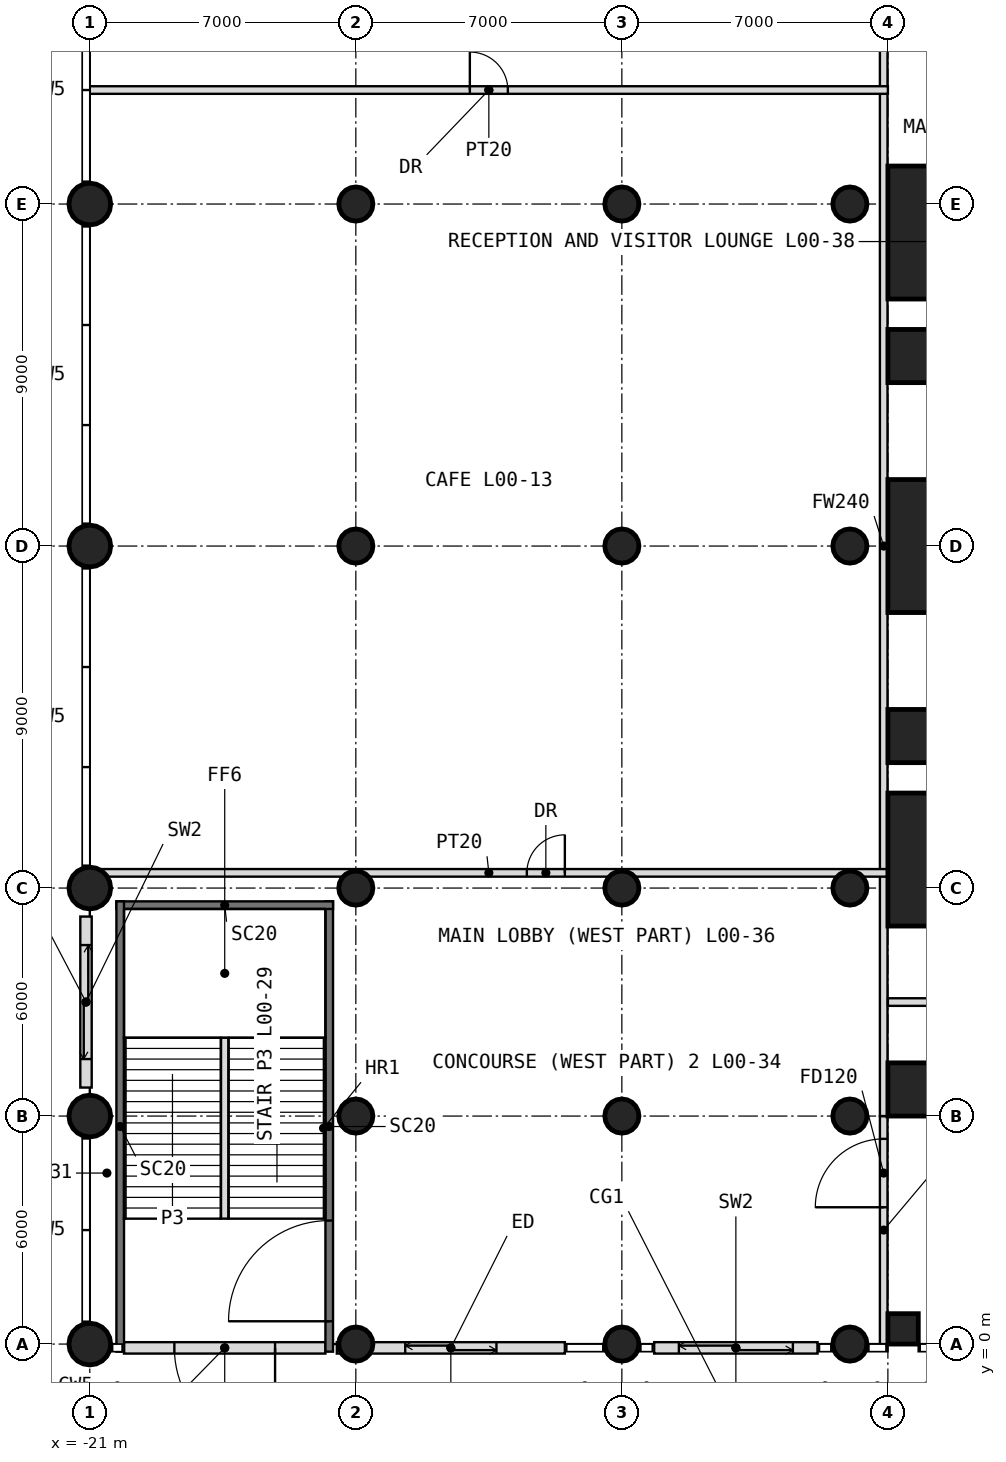
"""IFC4 building model, lengths in metres.
Left out: names, types, materials, properties, quantities, classifications, styles, units other than length and angle.
Written with IfcOpenShell. Run it as: python <this file> out.ifc"""

import sys

from ifc_helpers import new_model, si_unit, direction, frame, frame_2d, origin, origin_2d, place, context, subcontext, project, spatial, rectangle, circle, extrude, element, fill, save


model = new_model("IFC4")
c1 = context("Model", 3, precision=1e-05, world=origin(), true_north=direction((0.0, 1.0)))
c2 = subcontext(c1, "Body", "Model", "MODEL_VIEW")
j1 = project(units=[si_unit("LENGTHUNIT", "METRE"), si_unit("PLANEANGLEUNIT", "RADIAN")], contexts=[c1])
p1 = place(None, origin())
s1 = spatial("IfcSite", under=j1, at=p1, CompositionType="ELEMENT")
p2 = place(p1, origin())
s2 = spatial("IfcBuilding", under=s1, at=p2, CompositionType="ELEMENT")
p3 = place(p2, origin())
s3 = spatial("IfcBuildingStorey", under=s2, at=p3, CompositionType="ELEMENT", Elevation=0.0)
p4 = place(p3, frame((-21.0, 0.0, -0.4), z_axis=(0.0, 0.0, 1.0), x_axis=(1.0, 0.0, 0.0)))
e1 = element("IfcColumn", 1, at=p4, inside=s3, PredefinedType="COLUMN", context=c2, shape_type="SweptSolid", body=[
    extrude(circle(Radius=0.55, at=origin_2d()), origin(), (0.0, 0.0, 1.0), 6.4),
])
for number, where, z_axis, x_axis in (
    (2, (-14.0, 0.0, -0.4), (0.0, 0.0, 1.0), (1.0, 0.0, 0.0)),
    (3, (-7.0, 0.0, -0.4), (0.0, 0.0, 1.0), (1.0, 0.0, 0.0)),
    (4, (-1.0, 0.0, -0.4), (0.0, 0.0, 1.0), (1.0, 0.0, 0.0)),
):
    element("IfcColumn", number, at=place(p3, frame(where, z_axis=z_axis, x_axis=x_axis)), inside=s3, PredefinedType="COLUMN", context=c2, shape_type="SweptSolid", body=[
        extrude(circle(Radius=0.45, at=origin_2d()), origin(), (0.0, 0.0, 1.0), 6.4),
    ])
p5 = place(p3, frame((0.4, 0.4, -0.4), z_axis=(0.0, 0.0, 1.0), x_axis=(1.0, 0.0, 0.0)))
e5 = element("IfcColumn", 5, at=p5, inside=s3, PredefinedType="COLUMN", context=c2, shape_type="SweptSolid", body=[
    extrude(rectangle(XDim=0.8, YDim=0.8, at=origin_2d()), origin(), (0.0, 0.0, 1.0), 6.4),
])
p6 = place(p3, frame((-21.0, 6.0, -0.4), z_axis=(0.0, 0.0, 1.0), x_axis=(1.0, 0.0, 0.0)))
e6 = element("IfcColumn", 6, at=p6, inside=s3, PredefinedType="COLUMN", context=c2, shape_type="SweptSolid", body=[
    extrude(circle(Radius=0.55, at=origin_2d()), origin(), (0.0, 0.0, 1.0), 6.4),
])
for number, where, z_axis, x_axis in (
    (7, (-14.0, 6.0, -0.4), (0.0, 0.0, 1.0), (1.0, 0.0, 0.0)),
    (8, (-7.0, 6.0, -0.4), (0.0, 0.0, 1.0), (1.0, 0.0, 0.0)),
    (9, (-1.0, 6.0, -0.4), (0.0, 0.0, 1.0), (1.0, 0.0, 0.0)),
):
    element("IfcColumn", number, at=place(p3, frame(where, z_axis=z_axis, x_axis=x_axis)), inside=s3, PredefinedType="COLUMN", context=c2, shape_type="SweptSolid", body=[
        extrude(circle(Radius=0.45, at=origin_2d()), origin(), (0.0, 0.0, 1.0), 6.4),
    ])
p7 = place(p3, frame((0.7, 6.7, -0.4), z_axis=(0.0, 0.0, 1.0), x_axis=(1.0, 0.0, 0.0)))
e10 = element("IfcColumn", 10, at=p7, inside=s3, PredefinedType="COLUMN", context=c2, shape_type="SweptSolid", body=[
    extrude(rectangle(XDim=1.4, YDim=1.4, at=origin_2d()), origin(), (0.0, 0.0, 1.0), 6.4),
])
p8 = place(p3, frame((1.75, 12.75, -0.4), z_axis=(0.0, 0.0, 1.0), x_axis=(1.0, 0.0, 0.0)))
e11 = element("IfcColumn", 11, at=p8, inside=s3, PredefinedType="COLUMN", context=c2, shape_type="SweptSolid", body=[
    extrude(rectangle(XDim=3.5, YDim=3.5, at=origin_2d()), origin(), (0.0, 0.0, 1.0), 6.4),
])
p9 = place(p3, frame((-21.0, 12.0, -0.4), z_axis=(0.0, 0.0, 1.0), x_axis=(1.0, 0.0, 0.0)))
e12 = element("IfcColumn", 12, at=p9, inside=s3, PredefinedType="COLUMN", context=c2, shape_type="SweptSolid", body=[
    extrude(circle(Radius=0.55, at=origin_2d()), origin(), (0.0, 0.0, 1.0), 6.4),
])
for number, where, z_axis, x_axis in (
    (13, (-14.0, 12.0, -0.4), (0.0, 0.0, 1.0), (1.0, 0.0, 0.0)),
    (14, (-7.0, 12.0, -0.4), (0.0, 0.0, 1.0), (1.0, 0.0, 0.0)),
    (15, (-1.0, 12.0, -0.4), (0.0, 0.0, 1.0), (1.0, 0.0, 0.0)),
):
    element("IfcColumn", number, at=place(p3, frame(where, z_axis=z_axis, x_axis=x_axis)), inside=s3, PredefinedType="COLUMN", context=c2, shape_type="SweptSolid", body=[
        extrude(circle(Radius=0.45, at=origin_2d()), origin(), (0.0, 0.0, 1.0), 6.4),
    ])
p10 = place(p3, frame((0.7, 16.0, -0.4), z_axis=(0.0, 0.0, 1.0), x_axis=(1.0, 0.0, 0.0)))
e16 = element("IfcColumn", 16, at=p10, inside=s3, PredefinedType="COLUMN", context=c2, shape_type="SweptSolid", body=[
    extrude(rectangle(XDim=1.4, YDim=1.4, at=origin_2d()), origin(), (0.0, 0.0, 1.0), 6.4),
])
p11 = place(p3, frame((-21.0, 21.0, -0.4), z_axis=(0.0, 0.0, 1.0), x_axis=(1.0, 0.0, 0.0)))
e17 = element("IfcColumn", 17, at=p11, inside=s3, PredefinedType="COLUMN", context=c2, shape_type="SweptSolid", body=[
    extrude(circle(Radius=0.55, at=origin_2d()), origin(), (0.0, 0.0, 1.0), 6.4),
])
for number, where, z_axis, x_axis in (
    (18, (-14.0, 21.0, -0.4), (0.0, 0.0, 1.0), (1.0, 0.0, 0.0)),
    (19, (-7.0, 21.0, -0.4), (0.0, 0.0, 1.0), (1.0, 0.0, 0.0)),
    (20, (-1.0, 21.0, -0.4), (0.0, 0.0, 1.0), (1.0, 0.0, 0.0)),
):
    element("IfcColumn", number, at=place(p3, frame(where, z_axis=z_axis, x_axis=x_axis)), inside=s3, PredefinedType="COLUMN", context=c2, shape_type="SweptSolid", body=[
        extrude(circle(Radius=0.45, at=origin_2d()), origin(), (0.0, 0.0, 1.0), 6.4),
    ])
p12 = place(p3, frame((1.75, 21.0, -0.4), z_axis=(0.0, 0.0, 1.0), x_axis=(1.0, 0.0, 0.0)))
e21 = element("IfcColumn", 21, at=p12, inside=s3, PredefinedType="COLUMN", context=c2, shape_type="SweptSolid", body=[
    extrude(rectangle(XDim=3.5, YDim=3.5, at=origin_2d()), origin(), (0.0, 0.0, 1.0), 6.4),
])
p13 = place(p3, frame((0.7, 26.0, -0.4), z_axis=(0.0, 0.0, 1.0), x_axis=(1.0, 0.0, 0.0)))
e22 = element("IfcColumn", 22, at=p13, inside=s3, PredefinedType="COLUMN", context=c2, shape_type="SweptSolid", body=[
    extrude(rectangle(XDim=1.4, YDim=1.4, at=origin_2d()), origin(), (0.0, 0.0, 1.0), 6.4),
])
p14 = place(p3, frame((-21.0, 30.0, -0.4), z_axis=(0.0, 0.0, 1.0), x_axis=(1.0, 0.0, 0.0)))
e23 = element("IfcColumn", 23, at=p14, inside=s3, PredefinedType="COLUMN", context=c2, shape_type="SweptSolid", body=[
    extrude(circle(Radius=0.55, at=origin_2d()), origin(), (0.0, 0.0, 1.0), 6.4),
])
for number, where, z_axis, x_axis in (
    (24, (-14.0, 30.0, -0.4), (0.0, 0.0, 1.0), (1.0, 0.0, 0.0)),
    (25, (-7.0, 30.0, -0.4), (0.0, 0.0, 1.0), (1.0, 0.0, 0.0)),
    (26, (-1.0, 30.0, -0.4), (0.0, 0.0, 1.0), (1.0, 0.0, 0.0)),
):
    element("IfcColumn", number, at=place(p3, frame(where, z_axis=z_axis, x_axis=x_axis)), inside=s3, PredefinedType="COLUMN", context=c2, shape_type="SweptSolid", body=[
        extrude(circle(Radius=0.45, at=origin_2d()), origin(), (0.0, 0.0, 1.0), 6.4),
    ])
p15 = place(p3, frame((1.75, 29.25, -0.4), z_axis=(0.0, 0.0, 1.0), x_axis=(1.0, 0.0, 0.0)))
e27 = element("IfcColumn", 27, at=p15, inside=s3, PredefinedType="COLUMN", context=c2, shape_type="SweptSolid", body=[
    extrude(rectangle(XDim=3.5, YDim=3.5, at=origin_2d()), origin(), (0.0, 0.0, 1.0), 6.4),
])
p16 = place(p3, frame((-14.8, -0.1, 0.0), z_axis=(0.0, 0.0, 1.0), x_axis=(-1.0, 0.0, 0.0)))
e28 = element("IfcWall", 28, at=p16, inside=s3, PredefinedType="USERDEFINED", context=c2, shape_type="SweptSolid", body=[
    extrude(rectangle(XDim=5.3, YDim=0.3, at=frame_2d((2.65, 0.0))), origin(), (0.0, 0.0, 1.0), 4.6),
])
p17 = place(p16, frame((1.325, 0.0, 0.0)))
e29 = element("IfcOpeningElement", 29, at=p17, cuts=e28, PredefinedType="OPENING", context=c2, shape_type="SweptSolid", body=[
    extrude(rectangle(XDim=2.65, YDim=2.4, at=frame_2d((1.325, 1.2))), frame((0.0, 0.16, 0.0), z_axis=(0.0, -1.0, 0.0), x_axis=(1.0, 0.0, 0.0)), (0.0, 0.0, 1.0), 0.32),
])
p18 = place(p3, frame((-14.5, -0.1, 0.0), z_axis=(0.0, 0.0, 1.0), x_axis=(1.0, 0.0, 0.0)))
e30 = element("IfcWall", 30, at=p18, inside=s3, PredefinedType="USERDEFINED", context=c2, shape_type="SweptSolid", body=[
    extrude(rectangle(XDim=6.0, YDim=0.3, at=frame_2d((3.0, 0.0))), origin(), (0.0, 0.0, 1.0), 4.6),
])
p19 = place(p18, frame((1.8, 0.0, 0.0)))
e31 = element("IfcOpeningElement", 31, at=p19, cuts=e30, PredefinedType="OPENING", context=c2, shape_type="SweptSolid", body=[
    extrude(rectangle(XDim=2.4, YDim=3.0, at=frame_2d((1.2, 1.5))), frame((0.0, 0.16, 0.0), z_axis=(0.0, -1.0, 0.0), x_axis=(1.0, 0.0, 0.0)), (0.0, 0.0, 1.0), 0.32),
])
p20 = place(p3, frame((-6.15, -0.1, 0.0), z_axis=(0.0, 0.0, 1.0), x_axis=(1.0, 0.0, 0.0)))
e32 = element("IfcWall", 32, at=p20, inside=s3, PredefinedType="USERDEFINED", context=c2, shape_type="SweptSolid", body=[
    extrude(rectangle(XDim=4.3, YDim=0.3, at=frame_2d((2.15, 0.0))), origin(), (0.0, 0.0, 1.0), 4.6),
])
p21 = place(p20, frame((0.65, 0.0, 0.0)))
e33 = element("IfcOpeningElement", 33, at=p21, cuts=e32, PredefinedType="OPENING", context=c2, shape_type="SweptSolid", body=[
    extrude(rectangle(XDim=3.0, YDim=3.0, at=frame_2d((1.5, 1.5))), frame((0.0, 0.16, 0.0), z_axis=(0.0, -1.0, 0.0), x_axis=(1.0, 0.0, 0.0)), (0.0, 0.0, 1.0), 0.32),
])
p22 = place(p3, frame((-21.1, 11.25, 0.0), z_axis=(0.0, 0.0, 1.0), x_axis=(0.0, -1.0, 0.0)))
e34 = element("IfcWall", 34, at=p22, inside=s3, PredefinedType="USERDEFINED", context=c2, shape_type="SweptSolid", body=[
    extrude(rectangle(XDim=4.5, YDim=0.3, at=frame_2d((2.25, 0.0))), origin(), (0.0, 0.0, 1.0), 4.6),
])
p23 = place(p22, frame((0.75, 0.0, 0.0)))
e35 = element("IfcOpeningElement", 35, at=p23, cuts=e34, PredefinedType="OPENING", context=c2, shape_type="SweptSolid", body=[
    extrude(rectangle(XDim=3.0, YDim=3.0, at=frame_2d((1.5, 1.5))), frame((0.0, 0.16, 0.0), z_axis=(0.0, -1.0, 0.0), x_axis=(1.0, 0.0, 0.0)), (0.0, 0.0, 1.0), 0.32),
])
p24 = place(p3, frame((-14.7, -0.2, 0.0), z_axis=(0.0, 0.0, 1.0), x_axis=(0.0, 1.0, 0.0)))
e36 = element("IfcWall", 36, at=p24, inside=s3, PredefinedType="SOLIDWALL", context=c2, shape_type="SweptSolid", body=[
    extrude(rectangle(XDim=11.85, YDim=0.2, at=frame_2d((5.925, 0.0))), origin(), (0.0, 0.0, 1.0), 5.8),
])
p25 = place(p24, frame((0.8, 0.0, 0.0)))
e37 = element("IfcOpeningElement", 37, at=p25, cuts=e36, PredefinedType="OPENING", context=c2, shape_type="SweptSolid", body=[
    extrude(rectangle(XDim=2.65, YDim=2.4, at=frame_2d((1.325, 1.2))), frame((0.0, 0.11, 0.0), z_axis=(0.0, -1.0, 0.0), x_axis=(1.0, 0.0, 0.0)), (0.0, 0.0, 1.0), 0.22),
])
p26 = place(p3, frame((-14.6, 11.55, 0.0), z_axis=(0.0, 0.0, 1.0), x_axis=(-1.0, 0.0, 0.0)))
e38 = element("IfcWall", 38, at=p26, inside=s3, PredefinedType="SOLIDWALL", context=c2, shape_type="SweptSolid", body=[
    extrude(rectangle(XDim=5.7, YDim=0.2, at=frame_2d((2.85, 0.0))), origin(), (0.0, 0.0, 1.0), 5.8),
])
p27 = place(p3, frame((-20.2, 11.65, 0.0), z_axis=(0.0, 0.0, 1.0), x_axis=(0.0, -1.0, 0.0)))
e39 = element("IfcWall", 39, at=p27, inside=s3, PredefinedType="SOLIDWALL", context=c2, shape_type="SweptSolid", body=[
    extrude(rectangle(XDim=11.85, YDim=0.2, at=frame_2d((5.925, 0.0))), origin(), (0.0, 0.0, 1.0), 5.8),
])
p28 = place(p3, frame((-0.11, 0.0, 0.0), z_axis=(0.0, 0.0, 1.0), x_axis=(0.0, 1.0, 0.0)))
e40 = element("IfcWall", 40, at=p28, inside=s3, PredefinedType="PARTITIONING", context=c2, shape_type="SweptSolid", body=[
    extrude(rectangle(XDim=6.0, YDim=0.2, at=frame_2d((3.0, 0.0))), origin(), (0.0, 0.0, 1.0), 4.98),
])
p29 = place(p28, frame((3.6, 0.0, 0.0)))
e41 = element("IfcOpeningElement", 41, at=p29, cuts=e40, PredefinedType="OPENING", context=c2, shape_type="SweptSolid", body=[
    extrude(rectangle(XDim=1.8, YDim=2.4, at=frame_2d((0.9, 1.2))), frame((0.0, 0.11, 0.0), z_axis=(0.0, -1.0, 0.0), x_axis=(1.0, 0.0, 0.0)), (0.0, 0.0, 1.0), 0.22),
])
p30 = place(p3, frame((-0.11, 6.0, 0.0), z_axis=(0.0, 0.0, 1.0), x_axis=(0.0, 1.0, 0.0)))
e42 = element("IfcWall", 42, at=p30, inside=s3, PredefinedType="PARTITIONING", context=c2, shape_type="SweptSolid", body=[
    extrude(rectangle(XDim=30.0, YDim=0.2, at=frame_2d((15.0, 0.0))), origin(), (0.0, 0.0, 1.0), 5.6),
])
p31 = place(p3, frame((-21.0, 12.4, 0.0), z_axis=(0.0, 0.0, 1.0), x_axis=(1.0, 0.0, 0.0)))
e43 = element("IfcWall", 43, at=p31, inside=s3, PredefinedType="PARTITIONING", context=c2, shape_type="SweptSolid", body=[
    extrude(rectangle(XDim=21.0, YDim=0.2, at=frame_2d((10.5, 0.0))), origin(), (0.0, 0.0, 1.0), 5.6),
])
p32 = place(p31, frame((11.5, 0.0, 0.0)))
e44 = element("IfcOpeningElement", 44, at=p32, cuts=e43, PredefinedType="OPENING", context=c2, shape_type="SweptSolid", body=[
    extrude(rectangle(XDim=1.0, YDim=2.2, at=frame_2d((0.5, 1.1))), frame((0.0, 0.11, 0.0), z_axis=(0.0, -1.0, 0.0), x_axis=(1.0, 0.0, 0.0)), (0.0, 0.0, 1.0), 0.22),
])
p33 = place(p3, frame((-21.0, 33.0, 0.0), z_axis=(0.0, 0.0, 1.0), x_axis=(1.0, 0.0, 0.0)))
e45 = element("IfcWall", 45, at=p33, inside=s3, PredefinedType="PARTITIONING", context=c2, shape_type="SweptSolid", body=[
    extrude(rectangle(XDim=21.0, YDim=0.2, at=frame_2d((10.5, 0.0))), origin(), (0.0, 0.0, 1.0), 5.6),
])
p34 = place(p33, frame((10.0, 0.0, 0.0)))
e46 = element("IfcOpeningElement", 46, at=p34, cuts=e45, PredefinedType="OPENING", context=c2, shape_type="SweptSolid", body=[
    extrude(rectangle(XDim=1.0, YDim=2.2, at=frame_2d((0.5, 1.1))), frame((0.0, 0.11, 0.0), z_axis=(0.0, -1.0, 0.0), x_axis=(1.0, 0.0, 0.0)), (0.0, 0.0, 1.0), 0.22),
])
p35 = place(p3, frame((0.0, 9.0, 0.0), z_axis=(0.0, 0.0, 1.0), x_axis=(1.0, 0.0, 0.0)))
e47 = element("IfcWall", 47, at=p35, inside=s3, PredefinedType="PARTITIONING", context=c2, shape_type="SweptSolid", body=[
    extrude(rectangle(XDim=42.0, YDim=0.2, at=frame_2d((21.0, 0.0))), origin(), (0.0, 0.0, 1.0), 5.6),
])
p36 = place(p35, frame((11.0, 0.0, 0.0)))
e48 = element("IfcOpeningElement", 48, at=p36, cuts=e47, PredefinedType="OPENING", context=c2, shape_type="SweptSolid", body=[
    extrude(rectangle(XDim=2.0, YDim=2.2, at=frame_2d((1.0, 1.1))), frame((0.0, 0.11, 0.0), z_axis=(0.0, -1.0, 0.0), x_axis=(1.0, 0.0, 0.0)), (0.0, 0.0, 1.0), 0.22),
])
p37 = place(p35, frame((32.0, 0.0, 0.0)))
e49 = element("IfcOpeningElement", 49, at=p37, cuts=e47, PredefinedType="OPENING", context=c2, shape_type="SweptSolid", body=[
    extrude(rectangle(XDim=2.0, YDim=2.2, at=frame_2d((1.0, 1.1))), frame((0.0, 0.11, 0.0), z_axis=(0.0, -1.0, 0.0), x_axis=(1.0, 0.0, 0.0)), (0.0, 0.0, 1.0), 0.22),
])
p38 = place(p3, frame((-17.45, 3.3, 0.0), z_axis=(0.0, 0.0, 1.0), x_axis=(0.0, 1.0, 0.0)))
e50 = element("IfcWall", 50, at=p38, inside=s3, PredefinedType="PARTITIONING", context=c2, shape_type="SweptSolid", body=[
    extrude(rectangle(XDim=4.76, YDim=0.2, at=frame_2d((2.38, 0.0))), origin(), (0.0, 0.0, 1.0), 6.0),
])
p39 = place(p17, origin())
e51 = element("IfcDoor", 51, at=p39, inside=s3, OperationType="DOUBLE_DOOR_SINGLE_SWING", PredefinedType="DOOR", context=c2, shape_type="SweptSolid", body=[
    extrude(rectangle(XDim=2.65, YDim=2.4, at=frame_2d((1.325, 1.2))), frame((0.0, 0.025, 0.0), z_axis=(0.0, -1.0, 0.0), x_axis=(1.0, 0.0, 0.0)), (0.0, 0.0, 1.0), 0.05),
])
fill(e29, e51)
p40 = place(p19, origin())
e52 = element("IfcDoor", 52, at=p40, inside=s3, OperationType="DOUBLE_DOOR_SLIDING", PredefinedType="DOOR", context=c2, shape_type="SweptSolid", body=[
    extrude(rectangle(XDim=2.4, YDim=3.0, at=frame_2d((1.2, 1.5))), frame((0.0, 0.025, 0.0), z_axis=(0.0, -1.0, 0.0), x_axis=(1.0, 0.0, 0.0)), (0.0, 0.0, 1.0), 0.05),
])
fill(e31, e52)
p41 = place(p21, origin())
e53 = element("IfcDoor", 53, at=p41, inside=s3, OperationType="DOUBLE_DOOR_SLIDING", PredefinedType="DOOR", context=c2, shape_type="SweptSolid", body=[
    extrude(rectangle(XDim=3.0, YDim=3.0, at=frame_2d((1.5, 1.5))), frame((0.0, 0.025, 0.0), z_axis=(0.0, -1.0, 0.0), x_axis=(1.0, 0.0, 0.0)), (0.0, 0.0, 1.0), 0.05),
])
fill(e33, e53)
p42 = place(p23, origin())
e54 = element("IfcDoor", 54, at=p42, inside=s3, OperationType="DOUBLE_DOOR_SLIDING", PredefinedType="DOOR", context=c2, shape_type="SweptSolid", body=[
    extrude(rectangle(XDim=3.0, YDim=3.0, at=frame_2d((1.5, 1.5))), frame((0.0, 0.025, 0.0), z_axis=(0.0, -1.0, 0.0), x_axis=(1.0, 0.0, 0.0)), (0.0, 0.0, 1.0), 0.05),
])
fill(e35, e54)
p43 = place(p25, origin())
e55 = element("IfcDoor", 55, at=p43, inside=s3, OperationType="DOUBLE_DOOR_SINGLE_SWING", PredefinedType="DOOR", context=c2, shape_type="SweptSolid", body=[
    extrude(rectangle(XDim=2.65, YDim=2.4, at=frame_2d((1.325, 1.2))), frame((0.0, 0.025, 0.0), z_axis=(0.0, -1.0, 0.0), x_axis=(1.0, 0.0, 0.0)), (0.0, 0.0, 1.0), 0.05),
])
fill(e37, e55)
p44 = place(p29, origin())
e56 = element("IfcDoor", 56, at=p44, inside=s3, OperationType="DOUBLE_DOOR_SINGLE_SWING", PredefinedType="DOOR", context=c2, shape_type="SweptSolid", body=[
    extrude(rectangle(XDim=1.8, YDim=2.4, at=frame_2d((0.9, 1.2))), frame((0.0, 0.025, 0.0), z_axis=(0.0, -1.0, 0.0), x_axis=(1.0, 0.0, 0.0)), (0.0, 0.0, 1.0), 0.05),
])
fill(e41, e56)
p45 = place(p32, origin())
e57 = element("IfcDoor", 57, at=p45, inside=s3, OperationType="SINGLE_SWING_RIGHT", PredefinedType="DOOR", context=c2, shape_type="SweptSolid", body=[
    extrude(rectangle(XDim=1.0, YDim=2.2, at=frame_2d((0.5, 1.1))), frame((0.0, 0.025, 0.0), z_axis=(0.0, -1.0, 0.0), x_axis=(1.0, 0.0, 0.0)), (0.0, 0.0, 1.0), 0.05),
])
fill(e44, e57)
p46 = place(p34, origin())
e58 = element("IfcDoor", 58, at=p46, inside=s3, OperationType="SINGLE_SWING_LEFT", PredefinedType="DOOR", context=c2, shape_type="SweptSolid", body=[
    extrude(rectangle(XDim=1.0, YDim=2.2, at=frame_2d((0.5, 1.1))), frame((0.0, 0.025, 0.0), z_axis=(0.0, -1.0, 0.0), x_axis=(1.0, 0.0, 0.0)), (0.0, 0.0, 1.0), 0.05),
])
fill(e46, e58)
save(model, sys.argv[1])
